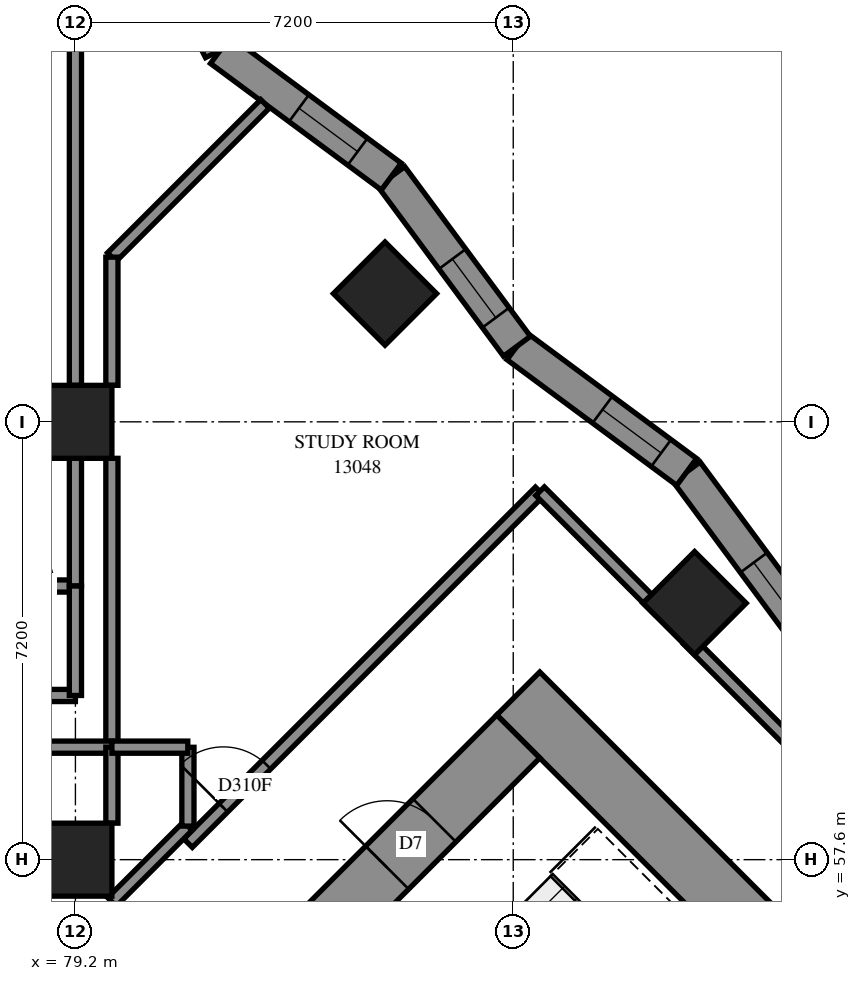
"""IFC4 building model, lengths in metres.
Left out: names, types, materials, properties, quantities, classifications, styles, units other than length and angle.
Written with IfcOpenShell. Run it as: python <this file> out.ifc"""

import sys

from ifc_helpers import new_model, si_unit, direction, frame, frame_2d, origin, origin_2d, place, context, subcontext, project, spatial, polyline, rectangle, outline, extrude, element, fill, save


model = new_model("IFC4")
c1 = context("Model", 3, precision=1e-05, world=origin(), true_north=direction((0.0, 1.0)))
c2 = subcontext(c1, "Body", "Model", "MODEL_VIEW")
j1 = project(units=[si_unit("LENGTHUNIT", "METRE"), si_unit("PLANEANGLEUNIT", "RADIAN")], contexts=[c1])
p1 = place(None, origin())
s1 = spatial("IfcSite", under=j1, at=p1, CompositionType="ELEMENT")
p2 = place(p1, origin())
s2 = spatial("IfcBuilding", under=s1, at=p2, CompositionType="ELEMENT")
p3 = place(p2, frame((0.0, 0.0, 50.8)))
s3 = spatial("IfcBuildingStorey", under=s2, at=p3, CompositionType="ELEMENT", Elevation=50.8)
for number, where, z_axis, x_axis in (
    (1, (79.2, 57.6, 0.0), (0.0, 0.0, 1.0), (1.0, 0.0, 0.0)),
    (2, (79.2, 64.8, 0.0), (0.0, 0.0, 1.0), (1.0, 0.0, 0.0)),
    (3, (84.291, 66.909, 0.0), (0.0, 0.0, 1.0), (0.707, -0.707, 0.0)),
    (4, (89.382, 61.818, 0.0), (0.0, 0.0, 1.0), (0.707, -0.707, 0.0)),
):
    element("IfcColumn", number, at=place(p3, frame(where, z_axis=z_axis, x_axis=x_axis)), inside=s3, PredefinedType="COLUMN", context=c2, shape_type="SweptSolid", body=[
        extrude(rectangle(XDim=1.2, YDim=1.2, at=origin_2d()), origin(), (0.0, 0.0, 1.0), 3.1),
    ])
p4 = place(p3, frame((86.483, 60.333, -0.3), z_axis=(0.0, 0.0, 1.0), x_axis=(0.70710983, -0.7071037324, 0.0)))
e5 = element("IfcWall", 5, at=p4, inside=s3, PredefinedType="SHEAR", context=c2, shape_type="SweptSolid", body=[
    extrude(rectangle(XDim=16.4, YDim=1.0, at=frame_2d((8.2, 0.0))), origin(), (0.0, 0.0, 1.0), 2.7),
])
p5 = place(p4, frame((11.0, 0.0, 0.3)))
e6 = element("IfcOpeningElement", 6, at=p5, cuts=e5, PredefinedType="OPENING", context=c2, shape_type="SweptSolid", body=[
    extrude(rectangle(XDim=0.8, YDim=2.1, at=frame_2d((0.4, 1.05))), frame((0.0, 0.51, 0.0), z_axis=(0.0, -1.0, 0.0), x_axis=(1.0, 0.0, 0.0)), (0.0, 0.0, 1.0), 1.02),
])
p6 = place(p3, frame((76.301, 49.443, -0.3), z_axis=(0.0, 0.0, 1.0), x_axis=(0.7071067812, 0.7071067812, 0.0)))
e7 = element("IfcWall", 7, at=p6, inside=s3, PredefinedType="SHEAR", context=c2, shape_type="SweptSolid", body=[
    extrude(rectangle(XDim=14.4, YDim=1.0, at=frame_2d((7.2, 0.0))), origin(), (0.0, 0.0, 1.0), 2.7),
])
p7 = place(p6, frame((4.55, 0.0, 0.3)))
e8 = element("IfcOpeningElement", 8, at=p7, cuts=e7, PredefinedType="OPENING", context=c2, shape_type="SweptSolid", body=[
    extrude(rectangle(XDim=1.1, YDim=2.1, at=frame_2d((0.55, 1.05))), frame((0.0, 0.51, 0.0), z_axis=(0.0, -1.0, 0.0), x_axis=(1.0, 0.0, 0.0)), (0.0, 0.0, 1.0), 1.02),
])
p8 = place(p6, frame((11.35, 0.0, 0.3)))
e9 = element("IfcOpeningElement", 9, at=p8, cuts=e7, PredefinedType="OPENING", context=c2, shape_type="SweptSolid", body=[
    extrude(rectangle(XDim=1.1, YDim=2.1, at=frame_2d((0.55, 1.05))), frame((0.0, 0.51, 0.0), z_axis=(0.0, -1.0, 0.0), x_axis=(1.0, 0.0, 0.0)), (0.0, 0.0, 1.0), 1.02),
])
p9 = place(p3, frame((91.319, 61.185, 0.0), z_axis=(0.0, 0.0, 1.0), x_axis=(-0.5951235593, 0.8036342136, 0.0)))
e10 = element("IfcWall", 10, at=p9, inside=s3, PredefinedType="SOLIDWALL", context=c2, shape_type="SweptSolid", body=[
    extrude(outline(polyline([(0.041, -0.275), (3.514, -0.275), (3.432, 0.275), (-0.041, 0.275), (0.041, -0.275)])), origin(), (0.0, 0.0, 1.0), 3.1),
])
p10 = place(p9, frame((0.418, 0.0, 0.5)))
e11 = element("IfcOpeningElement", 11, at=p10, cuts=e10, PredefinedType="OPENING", context=c2, shape_type="SweptSolid", body=[
    extrude(rectangle(XDim=1.2, YDim=2.45, at=frame_2d((0.6, 1.225))), frame((0.0, 0.285, 0.0), z_axis=(0.0, -1.0, 0.0), x_axis=(1.0, 0.0, 0.0)), (0.0, 0.0, 1.0), 0.57),
])
p11 = place(p3, frame((89.252, 63.976, 0.0), z_axis=(0.0, 0.0, 1.0), x_axis=(-0.8036306404, 0.5951283843, 0.0)))
e12 = element("IfcWall", 12, at=p11, inside=s3, PredefinedType="SOLIDWALL", context=c2, shape_type="SweptSolid", body=[
    extrude(outline(polyline([(-0.041, -0.275), (3.432, -0.275), (3.514, 0.275), (0.041, 0.275), (-0.041, -0.275)])), origin(), (0.0, 0.0, 1.0), 3.1),
])
p12 = place(p11, frame((0.522, 0.0, 0.5)))
e13 = element("IfcOpeningElement", 13, at=p12, cuts=e12, PredefinedType="OPENING", context=c2, shape_type="SweptSolid", body=[
    extrude(rectangle(XDim=1.2, YDim=2.45, at=frame_2d((0.6, 1.225))), frame((0.0, 0.285, 0.0), z_axis=(0.0, -1.0, 0.0), x_axis=(1.0, 0.0, 0.0)), (0.0, 0.0, 1.0), 0.57),
])
p13 = place(p3, frame((86.461, 66.043, 0.0), z_axis=(0.0, 0.0, 1.0), x_axis=(-0.5951421559, 0.8036204416, 0.0)))
e14 = element("IfcWall", 14, at=p13, inside=s3, PredefinedType="SOLIDWALL", context=c2, shape_type="SweptSolid", body=[
    extrude(outline(polyline([(0.041, -0.275), (3.514, -0.275), (3.432, 0.275), (-0.041, 0.275), (0.041, -0.275)])), origin(), (0.0, 0.0, 1.0), 3.1),
])
p14 = place(p13, frame((0.585, 0.0, 0.5)))
e15 = element("IfcOpeningElement", 15, at=p14, cuts=e14, PredefinedType="OPENING", context=c2, shape_type="SweptSolid", body=[
    extrude(rectangle(XDim=1.2, YDim=2.45, at=frame_2d((0.6, 1.225))), frame((0.0, 0.285, 0.0), z_axis=(0.0, -1.0, 0.0), x_axis=(1.0, 0.0, 0.0)), (0.0, 0.0, 1.0), 0.57),
])
p15 = place(p3, frame((84.394, 68.834, 0.0), z_axis=(0.0, 0.0, 1.0), x_axis=(-0.8036200162, 0.5951427304, 0.0)))
e16 = element("IfcWall", 16, at=p15, inside=s3, PredefinedType="SOLIDWALL", context=c2, shape_type="SweptSolid", body=[
    extrude(outline(polyline([(-0.041, -0.275), (3.432, -0.275), (3.561, 0.275), (0.041, 0.275), (-0.041, -0.275)])), origin(), (0.0, 0.0, 1.0), 3.1),
])
p16 = place(p15, frame((0.689, 0.0, 0.5)))
e17 = element("IfcOpeningElement", 17, at=p16, cuts=e16, PredefinedType="OPENING", context=c2, shape_type="SweptSolid", body=[
    extrude(rectangle(XDim=1.2, YDim=2.45, at=frame_2d((0.6, 1.225))), frame((0.0, 0.285, 0.0), z_axis=(0.0, -1.0, 0.0), x_axis=(1.0, 0.0, 0.0)), (0.0, 0.0, 1.0), 0.57),
])
p17 = place(p3, frame((81.585, 70.914, 0.0), z_axis=(0.0, 0.0, 1.0), x_axis=(-0.4549362519, 0.8905240068, 0.0)))
e18 = element("IfcWall", 18, at=p17, inside=s3, PredefinedType="SOLIDWALL", context=c2, shape_type="SweptSolid", body=[
    extrude(outline(polyline([(0.065, -0.275), (3.675, -0.275), (3.22, 0.275), (-0.065, 0.275), (0.065, -0.275)])), origin(), (0.0, 0.0, 1.0), 3.1),
])
p18 = place(p17, frame((0.79, 0.0, 0.5)))
e19 = element("IfcOpeningElement", 19, at=p18, cuts=e18, PredefinedType="OPENING", context=c2, shape_type="SweptSolid", body=[
    extrude(rectangle(XDim=1.2, YDim=2.45, at=frame_2d((0.6, 1.225))), frame((0.0, 0.285, 0.0), z_axis=(0.0, -1.0, 0.0), x_axis=(1.0, 0.0, 0.0)), (0.0, 0.0, 1.0), 0.57),
])
p19 = place(p3, frame((81.052, 57.873, 0.0), z_axis=(0.0, 0.0, 1.0), x_axis=(0.7071067812, 0.7071067812, 0.0)))
e20 = element("IfcWall", 20, at=p19, inside=s3, PredefinedType="PARTITIONING", context=c2, shape_type="SweptSolid", body=[
    extrude(rectangle(XDim=8.18, YDim=0.2, at=frame_2d((4.09, 0.0))), origin(), (0.0, 0.0, 1.0), 3.1),
])
p20 = place(p19, frame((0.823, 0.0, 0.0)))
e21 = element("IfcOpeningElement", 21, at=p20, cuts=e20, PredefinedType="OPENING", context=c2, shape_type="SweptSolid", body=[
    extrude(rectangle(XDim=1.0, YDim=2.1, at=frame_2d((0.5, 1.05))), frame((0.0, 0.11, 0.0), z_axis=(0.0, -1.0, 0.0), x_axis=(1.0, 0.0, 0.0)), (0.0, 0.0, 1.0), 0.22),
])
p21 = place(p3, frame((89.271, 61.215, 0.0), z_axis=(0.0, 0.0, 1.0), x_axis=(0.7071067812, -0.7071067812, 0.0)))
e22 = element("IfcWall", 22, at=p21, inside=s3, PredefinedType="PARTITIONING", context=c2, shape_type="SweptSolid", body=[
    extrude(rectangle(XDim=6.505, YDim=0.2, at=frame_2d((3.253, 0.0))), origin(), (0.0, 0.0, 1.0), 3.1),
])
p22 = place(p3, frame((79.2, 65.4, 0.0), z_axis=(0.0, 0.0, 1.0), x_axis=(0.0, 1.0, 0.0)))
e23 = element("IfcWall", 23, at=p22, inside=s3, PredefinedType="PARTITIONING", context=c2, shape_type="SweptSolid", body=[
    extrude(rectangle(XDim=6.0, YDim=0.2, at=frame_2d((3.0, 0.0))), origin(), (0.0, 0.0, 1.0), 3.1),
])
p23 = place(p3, frame((79.8, 59.45, 0.0), z_axis=(0.0, 0.0, 1.0), x_axis=(0.0, 1.0, 0.0)))
e24 = element("IfcWall", 24, at=p23, inside=s3, PredefinedType="PARTITIONING", context=c2, shape_type="SweptSolid", body=[
    extrude(rectangle(XDim=4.75, YDim=0.2, at=frame_2d((2.375, 0.0))), origin(), (0.0, 0.0, 1.0), 3.1),
])
p24 = place(p3, frame((75.102, 62.1, 0.0), z_axis=(0.0, 0.0, 1.0), x_axis=(1.0, 0.0, 0.0)))
e25 = element("IfcWall", 25, at=p24, inside=s3, PredefinedType="PARTITIONING", context=c2, shape_type="SweptSolid", body=[
    extrude(rectangle(XDim=4.098, YDim=0.2, at=frame_2d((2.049, 0.0))), origin(), (0.0, 0.0, 1.0), 3.1),
])
p25 = place(p24, frame((2.848, 0.0, 0.0)))
e26 = element("IfcOpeningElement", 26, at=p25, cuts=e25, PredefinedType="OPENING", context=c2, shape_type="SweptSolid", body=[
    extrude(rectangle(XDim=0.9, YDim=2.1, at=frame_2d((0.45, 1.05))), frame((0.0, 0.11, 0.0), z_axis=(0.0, -1.0, 0.0), x_axis=(1.0, 0.0, 0.0)), (0.0, 0.0, 1.0), 0.22),
])
p26 = place(p3, frame((79.799, 67.509, 0.0), z_axis=(0.0, 0.0, 1.0), x_axis=(0.7070927486, 0.7071208134, 0.0)))
e27 = element("IfcWall", 27, at=p26, inside=s3, PredefinedType="PARTITIONING", context=c2, shape_type="SweptSolid", body=[
    extrude(rectangle(XDim=3.563, YDim=0.2, at=frame_2d((1.782, 0.0))), origin(), (0.0, 0.0, 1.0), 3.1),
])
p27 = place(p3, frame((86.841, 63.659, 0.0), z_axis=(0.0, 0.0, 1.0), x_axis=(0.7067795096, -0.7074339014, 0.0)))
e28 = element("IfcWall", 28, at=p27, inside=s3, PredefinedType="PARTITIONING", context=c2, shape_type="SweptSolid", body=[
    extrude(rectangle(XDim=2.751, YDim=0.2, at=frame_2d((1.375, 0.0))), origin(), (0.0, 0.0, 1.0), 3.1),
])
p28 = place(p3, frame((76.902, 60.3, 0.0), z_axis=(0.0, 0.0, 1.0), x_axis=(1.0, 0.0, 0.0)))
e29 = element("IfcWall", 29, at=p28, inside=s3, PredefinedType="PARTITIONING", context=c2, shape_type="SweptSolid", body=[
    extrude(rectangle(XDim=2.298, YDim=0.2, at=frame_2d((1.149, 0.0))), origin(), (0.0, 0.0, 1.0), 3.1),
])
p29 = place(p3, frame((79.8, 65.4, 0.0), z_axis=(0.0, 0.0, 1.0), x_axis=(0.0, 1.0, 0.0)))
e30 = element("IfcWall", 30, at=p29, inside=s3, PredefinedType="PARTITIONING", context=c2, shape_type="SweptSolid", body=[
    extrude(rectangle(XDim=2.108, YDim=0.2, at=frame_2d((1.054, 0.0))), origin(), (0.0, 0.0, 1.0), 3.1),
])
p30 = place(p3, frame((79.2, 62.1, 0.0), z_axis=(0.0, 0.0, 1.0), x_axis=(0.0, 1.0, 0.0)))
e31 = element("IfcWall", 31, at=p30, inside=s3, PredefinedType="PARTITIONING", context=c2, shape_type="SweptSolid", body=[
    extrude(rectangle(XDim=2.1, YDim=0.2, at=frame_2d((1.05, 0.0))), origin(), (0.0, 0.0, 1.0), 3.1),
])
p31 = place(p3, frame((77.75, 59.45, 0.0), z_axis=(0.0, 0.0, 1.0), x_axis=(1.0, 0.0, 0.0)))
e32 = element("IfcWall", 32, at=p31, inside=s3, PredefinedType="PARTITIONING", context=c2, shape_type="SweptSolid", body=[
    extrude(rectangle(XDim=2.05, YDim=0.2, at=frame_2d((1.025, 0.0))), origin(), (0.0, 0.0, 1.0), 3.1),
])
p32 = place(p3, frame((79.2, 60.3, 0.0), z_axis=(0.0, 0.0, 1.0), x_axis=(0.0, 1.0, 0.0)))
e33 = element("IfcWall", 33, at=p32, inside=s3, PredefinedType="PARTITIONING", context=c2, shape_type="SweptSolid", body=[
    extrude(rectangle(XDim=1.8, YDim=0.2, at=frame_2d((0.9, 0.0))), origin(), (0.0, 0.0, 1.0), 3.1),
])
p33 = place(p3, frame((79.801, 56.905, 0.0), z_axis=(0.0, 0.0, 1.0), x_axis=(0.7071067812, 0.7071067812, 0.0)))
e34 = element("IfcWall", 34, at=p33, inside=s3, PredefinedType="PARTITIONING", context=c2, shape_type="SweptSolid", body=[
    extrude(rectangle(XDim=1.765, YDim=0.2, at=frame_2d((0.882, 0.0))), origin(), (0.0, 0.0, 1.0), 3.1),
])
p34 = place(p3, frame((81.05, 58.152, 0.0), z_axis=(0.0, 0.0, 1.0), x_axis=(0.0, 1.0, 0.0)))
e35 = element("IfcWall", 35, at=p34, inside=s3, PredefinedType="PARTITIONING", context=c2, shape_type="SweptSolid", body=[
    extrude(rectangle(XDim=1.296, YDim=0.2, at=frame_2d((0.648, 0.0))), origin(), (0.0, 0.0, 1.0), 3.1),
])
p35 = place(p3, frame((79.8, 58.2, 0.0), z_axis=(0.0, 0.0, 1.0), x_axis=(0.0, 1.0, 0.0)))
e36 = element("IfcWall", 36, at=p35, inside=s3, PredefinedType="PARTITIONING", context=c2, shape_type="SweptSolid", body=[
    extrude(rectangle(XDim=1.25, YDim=0.2, at=frame_2d((0.625, 0.0))), origin(), (0.0, 0.0, 1.0), 3.1),
])
p36 = place(p3, frame((79.8, 59.45, 0.0), z_axis=(0.0, 0.0, 1.0), x_axis=(1.0, 0.0, 0.0)))
e37 = element("IfcWall", 37, at=p36, inside=s3, PredefinedType="PARTITIONING", context=c2, shape_type="SweptSolid", body=[
    extrude(rectangle(XDim=1.248, YDim=0.2, at=frame_2d((0.624, 0.0))), origin(), (0.0, 0.0, 1.0), 3.1),
])
p37 = place(p10, origin())
e38 = element("IfcWindow", 38, at=p37, inside=s3, PartitioningType="SINGLE_PANEL", PredefinedType="WINDOW", context=c2, shape_type="SweptSolid", body=[
    extrude(rectangle(XDim=1.2, YDim=2.45, at=frame_2d((0.6, 1.225))), frame((0.0, 0.155, 0.0), z_axis=(0.0, -1.0, 0.0), x_axis=(1.0, 0.0, 0.0)), (0.0, 0.0, 1.0), 0.06),
])
fill(e11, e38)
p38 = place(p12, origin())
e39 = element("IfcWindow", 39, at=p38, inside=s3, PartitioningType="SINGLE_PANEL", PredefinedType="WINDOW", context=c2, shape_type="SweptSolid", body=[
    extrude(rectangle(XDim=1.2, YDim=2.45, at=frame_2d((0.6, 1.225))), frame((0.0, 0.155, 0.0), z_axis=(0.0, -1.0, 0.0), x_axis=(1.0, 0.0, 0.0)), (0.0, 0.0, 1.0), 0.06),
])
fill(e13, e39)
p39 = place(p14, origin())
e40 = element("IfcWindow", 40, at=p39, inside=s3, PartitioningType="SINGLE_PANEL", PredefinedType="WINDOW", context=c2, shape_type="SweptSolid", body=[
    extrude(rectangle(XDim=1.2, YDim=2.45, at=frame_2d((0.6, 1.225))), frame((0.0, 0.155, 0.0), z_axis=(0.0, -1.0, 0.0), x_axis=(1.0, 0.0, 0.0)), (0.0, 0.0, 1.0), 0.06),
])
fill(e15, e40)
p40 = place(p16, origin())
e41 = element("IfcWindow", 41, at=p40, inside=s3, PartitioningType="SINGLE_PANEL", PredefinedType="WINDOW", context=c2, shape_type="SweptSolid", body=[
    extrude(rectangle(XDim=1.2, YDim=2.45, at=frame_2d((0.6, 1.225))), frame((0.0, 0.155, 0.0), z_axis=(0.0, -1.0, 0.0), x_axis=(1.0, 0.0, 0.0)), (0.0, 0.0, 1.0), 0.06),
])
fill(e17, e41)
p41 = place(p8, origin())
e42 = element("IfcDoor", 42, at=p41, inside=s3, OperationType="SINGLE_SWING_LEFT", PredefinedType="DOOR", context=c2, shape_type="SweptSolid", body=[
    extrude(rectangle(XDim=1.1, YDim=2.1, at=frame_2d((0.55, 1.05))), frame((0.0, 0.025, 0.0), z_axis=(0.0, -1.0, 0.0), x_axis=(1.0, 0.0, 0.0)), (0.0, 0.0, 1.0), 0.05),
])
fill(e9, e42)
p42 = place(p25, origin())
e43 = element("IfcDoor", 43, at=p42, inside=s3, OperationType="SINGLE_SWING_LEFT", PredefinedType="DOOR", context=c2, shape_type="SweptSolid", body=[
    extrude(rectangle(XDim=0.9, YDim=2.1, at=frame_2d((0.45, 1.05))), frame((0.0, 0.025, 0.0), z_axis=(0.0, -1.0, 0.0), x_axis=(1.0, 0.0, 0.0)), (0.0, 0.0, 1.0), 0.05),
])
fill(e26, e43)
p43 = place(p20, origin())
e44 = element("IfcDoor", 44, at=p43, inside=s3, OperationType="SINGLE_SWING_RIGHT", PredefinedType="DOOR", context=c2, shape_type="SweptSolid", body=[
    extrude(rectangle(XDim=1.0, YDim=2.1, at=frame_2d((0.5, 1.05))), frame((0.0, 0.025, 0.0), z_axis=(0.0, -1.0, 0.0), x_axis=(1.0, 0.0, 0.0)), (0.0, 0.0, 1.0), 0.05),
])
fill(e21, e44)
save(model, sys.argv[1])
